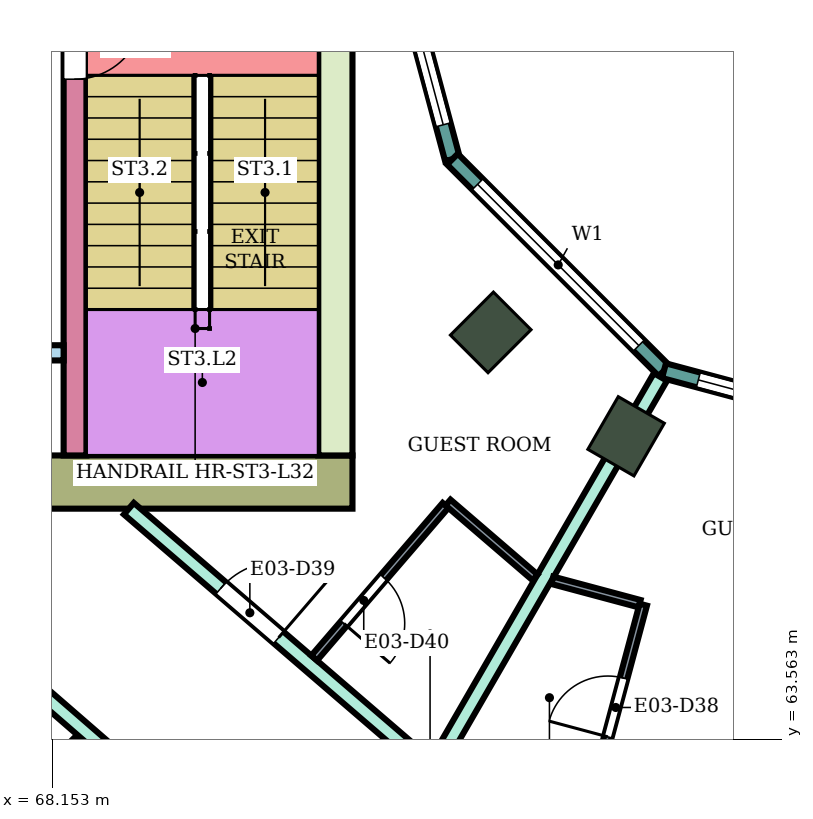
"""IFC4 building model, lengths in metres.
Left out: names, types, materials, properties, quantities, classifications, styles, units other than length and angle.
Written with IfcOpenShell. Run it as: python <this file> out.ifc"""

import sys

from ifc_helpers import new_model, si_unit, direction, frame, frame_2d, origin, origin_2d, place, context, subcontext, project, spatial, rectangle, extrude, element, fill, save


model = new_model("IFC4")
c1 = context("Model", 3, precision=1e-05, world=origin(), true_north=direction((0.0, 1.0)))
c2 = subcontext(c1, "Body", "Model", "MODEL_VIEW")
j1 = project(units=[si_unit("LENGTHUNIT", "METRE"), si_unit("PLANEANGLEUNIT", "RADIAN")], contexts=[c1])
p1 = place(None, origin())
s1 = spatial("IfcSite", under=j1, at=p1, CompositionType="ELEMENT")
p2 = place(p1, origin())
s2 = spatial("IfcBuilding", under=s1, at=p2, CompositionType="ELEMENT")
p3 = place(p2, frame((0.0, 0.0, 138.0)))
s3 = spatial("IfcBuildingStorey", under=s2, at=p3, CompositionType="ELEMENT", Elevation=138.0)
for number, where, z_axis, x_axis in (
    (1, (73.919, 68.919, 0.0), (0.0, 0.0, 1.0), (-0.707, -0.707, 0.0)),
    (2, (75.7, 67.552, 0.0), (0.0, 0.0, 1.0), (-0.5, -0.866, 0.0)),
):
    element("IfcColumn", number, at=place(p3, frame(where, z_axis=z_axis, x_axis=x_axis)), inside=s3, PredefinedType="COLUMN", context=c2, shape_type="SweptSolid", body=[
        extrude(rectangle(XDim=0.8, YDim=0.7, at=origin_2d()), origin(), (0.0, 0.0, 1.0), 3.9),
    ])
p4 = place(p3, frame((72.1, 66.95, 0.0), z_axis=(0.0, 0.0, 1.0), x_axis=(-1.0, 0.0, 0.0)))
e3 = element("IfcWall", 3, at=p4, inside=s3, PredefinedType="SHEAR", context=c2, shape_type="SweptSolid", body=[
    extrude(rectangle(XDim=14.8, YDim=0.7, at=frame_2d((7.4, 0.0))), origin(), (0.0, 0.0, 1.0), 3.58),
])
p5 = place(p4, frame((4.2, 0.0, 0.0)))
e4 = element("IfcOpeningElement", 4, at=p5, cuts=e3, PredefinedType="OPENING", context=c2, shape_type="SweptSolid", body=[
    extrude(rectangle(XDim=2.4, YDim=2.4, at=frame_2d((1.2, 1.2))), frame((0.0, 0.36, 0.0), z_axis=(0.0, -1.0, 0.0), x_axis=(1.0, 0.0, 0.0)), (0.0, 0.0, 1.0), 0.72),
])
p6 = place(p3, frame((71.875, 75.0, 0.0), z_axis=(0.0, 0.0, 1.0), x_axis=(0.0, -1.0, 0.0)))
e5 = element("IfcWall", 5, at=p6, inside=s3, PredefinedType="SHEAR", context=c2, shape_type="SweptSolid", body=[
    extrude(rectangle(XDim=7.7, YDim=0.45, at=frame_2d((3.85, 0.0))), origin(), (0.0, 0.0, 1.0), 3.58),
])
p7 = place(p3, frame((68.45, 75.0, 0.0), z_axis=(0.0, 0.0, 1.0), x_axis=(0.0, -1.0, 0.0)))
e6 = element("IfcWall", 6, at=p7, inside=s3, PredefinedType="SHEAR", context=c2, shape_type="SweptSolid", body=[
    extrude(rectangle(XDim=7.7, YDim=0.3, at=frame_2d((3.85, 0.0))), origin(), (0.0, 0.0, 1.0), 3.58),
])
p8 = place(p7, frame((1.85, 0.0, 0.0)))
e7 = element("IfcOpeningElement", 7, at=p8, cuts=e6, PredefinedType="OPENING", context=c2, shape_type="SweptSolid", body=[
    extrude(rectangle(XDim=0.9, YDim=2.1, at=frame_2d((0.45, 1.05))), frame((0.0, 0.16, 0.0), z_axis=(0.0, -1.0, 0.0), x_axis=(1.0, 0.0, 0.0)), (0.0, 0.0, 1.0), 0.32),
])
p9 = place(p3, frame((68.3, 68.65, 0.0), z_axis=(0.0, 0.0, 1.0), x_axis=(-1.0, 0.0, 0.0)))
e8 = element("IfcWall", 8, at=p9, inside=s3, PredefinedType="SHEAR", context=c2, shape_type="SweptSolid", body=[
    extrude(rectangle(XDim=4.5, YDim=0.2, at=frame_2d((2.25, 0.0))), origin(), (0.0, 0.0, 1.0), 3.58),
])
p10 = place(p3, frame((72.396, 75.0, 0.0), z_axis=(0.0, 0.0, 1.0), x_axis=(0.258789828301, -0.965933654434, 0.0)))
e9 = element("IfcWall", 9, at=p10, inside=s3, PredefinedType="NOTDEFINED", context=c2, shape_type="SweptSolid", body=[
    extrude(rectangle(XDim=3.936, YDim=0.2, at=frame_2d((1.968, 0.0))), origin(), (0.0, 0.0, 1.0), 3.9),
])
p11 = place(p10, frame((0.468, 0.0, 0.9)))
e10 = element("IfcOpeningElement", 10, at=p11, cuts=e9, PredefinedType="OPENING", context=c2, shape_type="SweptSolid", body=[
    extrude(rectangle(XDim=3.0, YDim=2.3, at=frame_2d((1.5, 1.15))), frame((0.0, 0.11, 0.0), z_axis=(0.0, -1.0, 0.0), x_axis=(1.0, 0.0, 0.0)), (0.0, 0.0, 1.0), 0.22),
])
p12 = place(p3, frame((73.415, 71.198, 0.0), z_axis=(0.0, 0.0, 1.0), x_axis=(0.707106781187, -0.707106781187, 0.0)))
e11 = element("IfcWall", 11, at=p12, inside=s3, PredefinedType="NOTDEFINED", context=c2, shape_type="SweptSolid", body=[
    extrude(rectangle(XDim=3.936, YDim=0.2, at=frame_2d((1.968, 0.0))), origin(), (0.0, 0.0, 1.0), 3.9),
])
p13 = place(p12, frame((0.468, 0.0, 0.9)))
e12 = element("IfcOpeningElement", 12, at=p13, cuts=e11, PredefinedType="OPENING", context=c2, shape_type="SweptSolid", body=[
    extrude(rectangle(XDim=3.0, YDim=2.3, at=frame_2d((1.5, 1.15))), frame((0.0, 0.11, 0.0), z_axis=(0.0, -1.0, 0.0), x_axis=(1.0, 0.0, 0.0)), (0.0, 0.0, 1.0), 0.22),
])
p14 = place(p3, frame((76.198, 68.415, 0.0), z_axis=(0.0, 0.0, 1.0), x_axis=(0.965933654434, -0.258789828301, 0.0)))
e13 = element("IfcWall", 13, at=p14, inside=s3, PredefinedType="NOTDEFINED", context=c2, shape_type="SweptSolid", body=[
    extrude(rectangle(XDim=3.936, YDim=0.2, at=frame_2d((1.968, 0.0))), origin(), (0.0, 0.0, 1.0), 3.9),
])
p15 = place(p14, frame((0.468, 0.0, 0.9)))
e14 = element("IfcOpeningElement", 14, at=p15, cuts=e13, PredefinedType="OPENING", context=c2, shape_type="SweptSolid", body=[
    extrude(rectangle(XDim=3.0, YDim=2.3, at=frame_2d((1.5, 1.15))), frame((0.0, 0.11, 0.0), z_axis=(0.0, -1.0, 0.0), x_axis=(1.0, 0.0, 0.0)), (0.0, 0.0, 1.0), 0.22),
])
p16 = place(p3, frame((63.593, 58.599, 0.0), z_axis=(0.0, 0.0, 1.0), x_axis=(0.707228748718, 0.706984792613, 0.0)))
e15 = element("IfcWall", 15, at=p16, inside=s3, PredefinedType="PARTITIONING", context=c2, shape_type="SweptSolid", body=[
    extrude(rectangle(XDim=7.005, YDim=0.2, at=frame_2d((3.503, 0.0))), origin(), (0.0, 0.0, 1.0), 3.45),
])
p17 = place(p3, frame((67.082, 64.972, 0.0), z_axis=(0.0, 0.0, 1.0), x_axis=(0.755031061605, -0.65568902386, 0.0)))
e16 = element("IfcWall", 16, at=p17, inside=s3, PredefinedType="PARTITIONING", context=c2, shape_type="SweptSolid", body=[
    extrude(rectangle(XDim=6.186, YDim=0.2, at=frame_2d((3.093, 0.0))), origin(), (0.0, 0.0, 1.0), 3.45),
])
p18 = place(p17, frame((4.755, 0.0, 0.0)))
e17 = element("IfcOpeningElement", 17, at=p18, cuts=e16, PredefinedType="OPENING", context=c2, shape_type="SweptSolid", body=[
    extrude(rectangle(XDim=1.0, YDim=2.1, at=frame_2d((0.5, 1.05))), frame((0.0, 0.11, 0.0), z_axis=(0.0, -1.0, 0.0), x_axis=(1.0, 0.0, 0.0)), (0.0, 0.0, 1.0), 0.22),
])
p19 = place(p3, frame((69.158, 66.6, 0.0), z_axis=(0.0, 0.0, 1.0), x_axis=(0.757976058094, -0.652282373943, 0.0)))
e18 = element("IfcWall", 18, at=p19, inside=s3, PredefinedType="PARTITIONING", context=c2, shape_type="SweptSolid", body=[
    extrude(rectangle(XDim=5.16, YDim=0.2, at=frame_2d((2.58, 0.0))), origin(), (0.0, 0.0, 1.0), 3.45),
])
p20 = place(p19, frame((1.6, 0.0, 0.0)))
e19 = element("IfcOpeningElement", 19, at=p20, cuts=e18, PredefinedType="OPENING", context=c2, shape_type="SweptSolid", body=[
    extrude(rectangle(XDim=1.0, YDim=2.1, at=frame_2d((0.5, 1.05))), frame((0.0, 0.11, 0.0), z_axis=(0.0, -1.0, 0.0), x_axis=(1.0, 0.0, 0.0)), (0.0, 0.0, 1.0), 0.22),
])
p21 = place(p3, frame((73.173, 63.176, 0.0), z_axis=(0.0, 0.0, 1.0), x_axis=(0.500239348149, 0.865887171959, 0.0)))
e20 = element("IfcWall", 20, at=p21, inside=s3, PredefinedType="PARTITIONING", context=c2, shape_type="SweptSolid", body=[
    extrude(rectangle(XDim=5.955, YDim=0.2, at=frame_2d((2.978, 0.0))), origin(), (0.0, 0.0, 1.0), 3.45),
])
p22 = place(p3, frame((71.596, 64.635, 0.0), z_axis=(0.0, 0.0, 1.0), x_axis=(0.652285007511, 0.757973791748, 0.0)))
e21 = element("IfcWall", 21, at=p22, inside=s3, PredefinedType="PARTITIONING", context=c2, shape_type="SweptSolid", body=[
    extrude(rectangle(XDim=2.65, YDim=0.1, at=frame_2d((1.325, 0.0))), origin(), (0.0, 0.0, 1.0), 3.45),
])
p23 = place(p22, frame((0.6, 0.0, 0.0)))
e22 = element("IfcOpeningElement", 22, at=p23, cuts=e21, PredefinedType="OPENING", context=c2, shape_type="SweptSolid", body=[
    extrude(rectangle(XDim=0.8, YDim=2.1, at=frame_2d((0.4, 1.05))), frame((0.0, 0.06, 0.0), z_axis=(0.0, -1.0, 0.0), x_axis=(1.0, 0.0, 0.0)), (0.0, 0.0, 1.0), 0.12),
])
p24 = place(p3, frame((73.357, 66.681, 0.0), z_axis=(0.0, 0.0, 1.0), x_axis=(0.758263469747, -0.651948242154, 0.0)))
e23 = element("IfcWall", 23, at=p24, inside=s3, PredefinedType="PARTITIONING", context=c2, shape_type="SweptSolid", body=[
    extrude(rectangle(XDim=1.511, YDim=0.1, at=frame_2d((0.755, 0.0))), origin(), (0.0, 0.0, 1.0), 3.45),
])
p25 = place(p3, frame((74.729, 65.657, 0.0), z_axis=(0.0, 0.0, 1.0), x_axis=(0.965948051503, -0.258736085224, 0.0)))
e24 = element("IfcWall", 24, at=p25, inside=s3, PredefinedType="PARTITIONING", context=c2, shape_type="SweptSolid", body=[
    extrude(rectangle(XDim=1.189, YDim=0.1, at=frame_2d((0.594, 0.0))), origin(), (0.0, 0.0, 1.0), 3.45),
])
p26 = place(p3, frame((75.227, 62.729, 0.0), z_axis=(0.0, 0.0, 1.0), x_axis=(0.258945475746, 0.965891940432, 0.0)))
e25 = element("IfcWall", 25, at=p26, inside=s3, PredefinedType="PARTITIONING", context=c2, shape_type="SweptSolid", body=[
    extrude(rectangle(XDim=2.7, YDim=0.1, at=frame_2d((1.35, 0.0))), origin(), (0.0, 0.0, 1.0), 3.45),
])
p27 = place(p26, frame((0.9, 0.0, 0.0)))
e26 = element("IfcOpeningElement", 26, at=p27, cuts=e25, PredefinedType="OPENING", context=c2, shape_type="SweptSolid", body=[
    extrude(rectangle(XDim=0.8, YDim=2.1, at=frame_2d((0.4, 1.05))), frame((0.0, 0.06, 0.0), z_axis=(0.0, -1.0, 0.0), x_axis=(1.0, 0.0, 0.0)), (0.0, 0.0, 1.0), 0.12),
])
p28 = place(p11, origin())
e27 = element("IfcWindow", 27, at=p28, inside=s3, PartitioningType="SINGLE_PANEL", PredefinedType="WINDOW", context=c2, shape_type="SweptSolid", body=[
    extrude(rectangle(XDim=3.0, YDim=2.3, at=frame_2d((1.5, 1.15))), frame((0.0, 0.03, 0.0), z_axis=(0.0, -1.0, 0.0), x_axis=(1.0, 0.0, 0.0)), (0.0, 0.0, 1.0), 0.06),
])
fill(e10, e27)
p29 = place(p13, origin())
e28 = element("IfcWindow", 28, at=p29, inside=s3, PartitioningType="SINGLE_PANEL", PredefinedType="WINDOW", context=c2, shape_type="SweptSolid", body=[
    extrude(rectangle(XDim=3.0, YDim=2.3, at=frame_2d((1.5, 1.15))), frame((0.0, 0.03, 0.0), z_axis=(0.0, -1.0, 0.0), x_axis=(1.0, 0.0, 0.0)), (0.0, 0.0, 1.0), 0.06),
])
fill(e12, e28)
p30 = place(p15, origin())
e29 = element("IfcWindow", 29, at=p30, inside=s3, PartitioningType="SINGLE_PANEL", PredefinedType="WINDOW", context=c2, shape_type="SweptSolid", body=[
    extrude(rectangle(XDim=3.0, YDim=2.3, at=frame_2d((1.5, 1.15))), frame((0.0, 0.03, 0.0), z_axis=(0.0, -1.0, 0.0), x_axis=(1.0, 0.0, 0.0)), (0.0, 0.0, 1.0), 0.06),
])
fill(e14, e29)
p31 = place(p27, origin())
e30 = element("IfcDoor", 30, at=p31, inside=s3, OperationType="SINGLE_SWING_LEFT", PredefinedType="DOOR", context=c2, shape_type="SweptSolid", body=[
    extrude(rectangle(XDim=0.8, YDim=2.1, at=frame_2d((0.4, 1.05))), frame((0.0, 0.025, 0.0), z_axis=(0.0, -1.0, 0.0), x_axis=(1.0, 0.0, 0.0)), (0.0, 0.0, 1.0), 0.05),
])
fill(e26, e30)
p32 = place(p20, origin())
e31 = element("IfcDoor", 31, at=p32, inside=s3, OperationType="SINGLE_SWING_RIGHT", PredefinedType="DOOR", context=c2, shape_type="SweptSolid", body=[
    extrude(rectangle(XDim=1.0, YDim=2.1, at=frame_2d((0.5, 1.05))), frame((0.0, 0.025, 0.0), z_axis=(0.0, -1.0, 0.0), x_axis=(1.0, 0.0, 0.0)), (0.0, 0.0, 1.0), 0.05),
])
fill(e19, e31)
p33 = place(p23, frame((0.8, 0.0, 0.0), z_axis=(0.0, 0.0, 1.0), x_axis=(-1.0, 0.0, 0.0)))
e32 = element("IfcDoor", 32, at=p33, inside=s3, OperationType="SINGLE_SWING_RIGHT", PredefinedType="DOOR", context=c2, shape_type="SweptSolid", body=[
    extrude(rectangle(XDim=0.8, YDim=2.1, at=frame_2d((0.4, 1.05))), frame((0.0, 0.025, 0.0), z_axis=(0.0, -1.0, 0.0), x_axis=(1.0, 0.0, 0.0)), (0.0, 0.0, 1.0), 0.05),
])
fill(e22, e32)
p34 = place(p8, origin())
e33 = element("IfcDoor", 33, at=p34, inside=s3, OperationType="SINGLE_SWING_LEFT", PredefinedType="DOOR", context=c2, shape_type="SweptSolid", body=[
    extrude(rectangle(XDim=0.9, YDim=2.1, at=frame_2d((0.45, 1.05))), frame((0.0, 0.025, 0.0), z_axis=(0.0, -1.0, 0.0), x_axis=(1.0, 0.0, 0.0)), (0.0, 0.0, 1.0), 0.05),
])
fill(e7, e33)
save(model, sys.argv[1])
